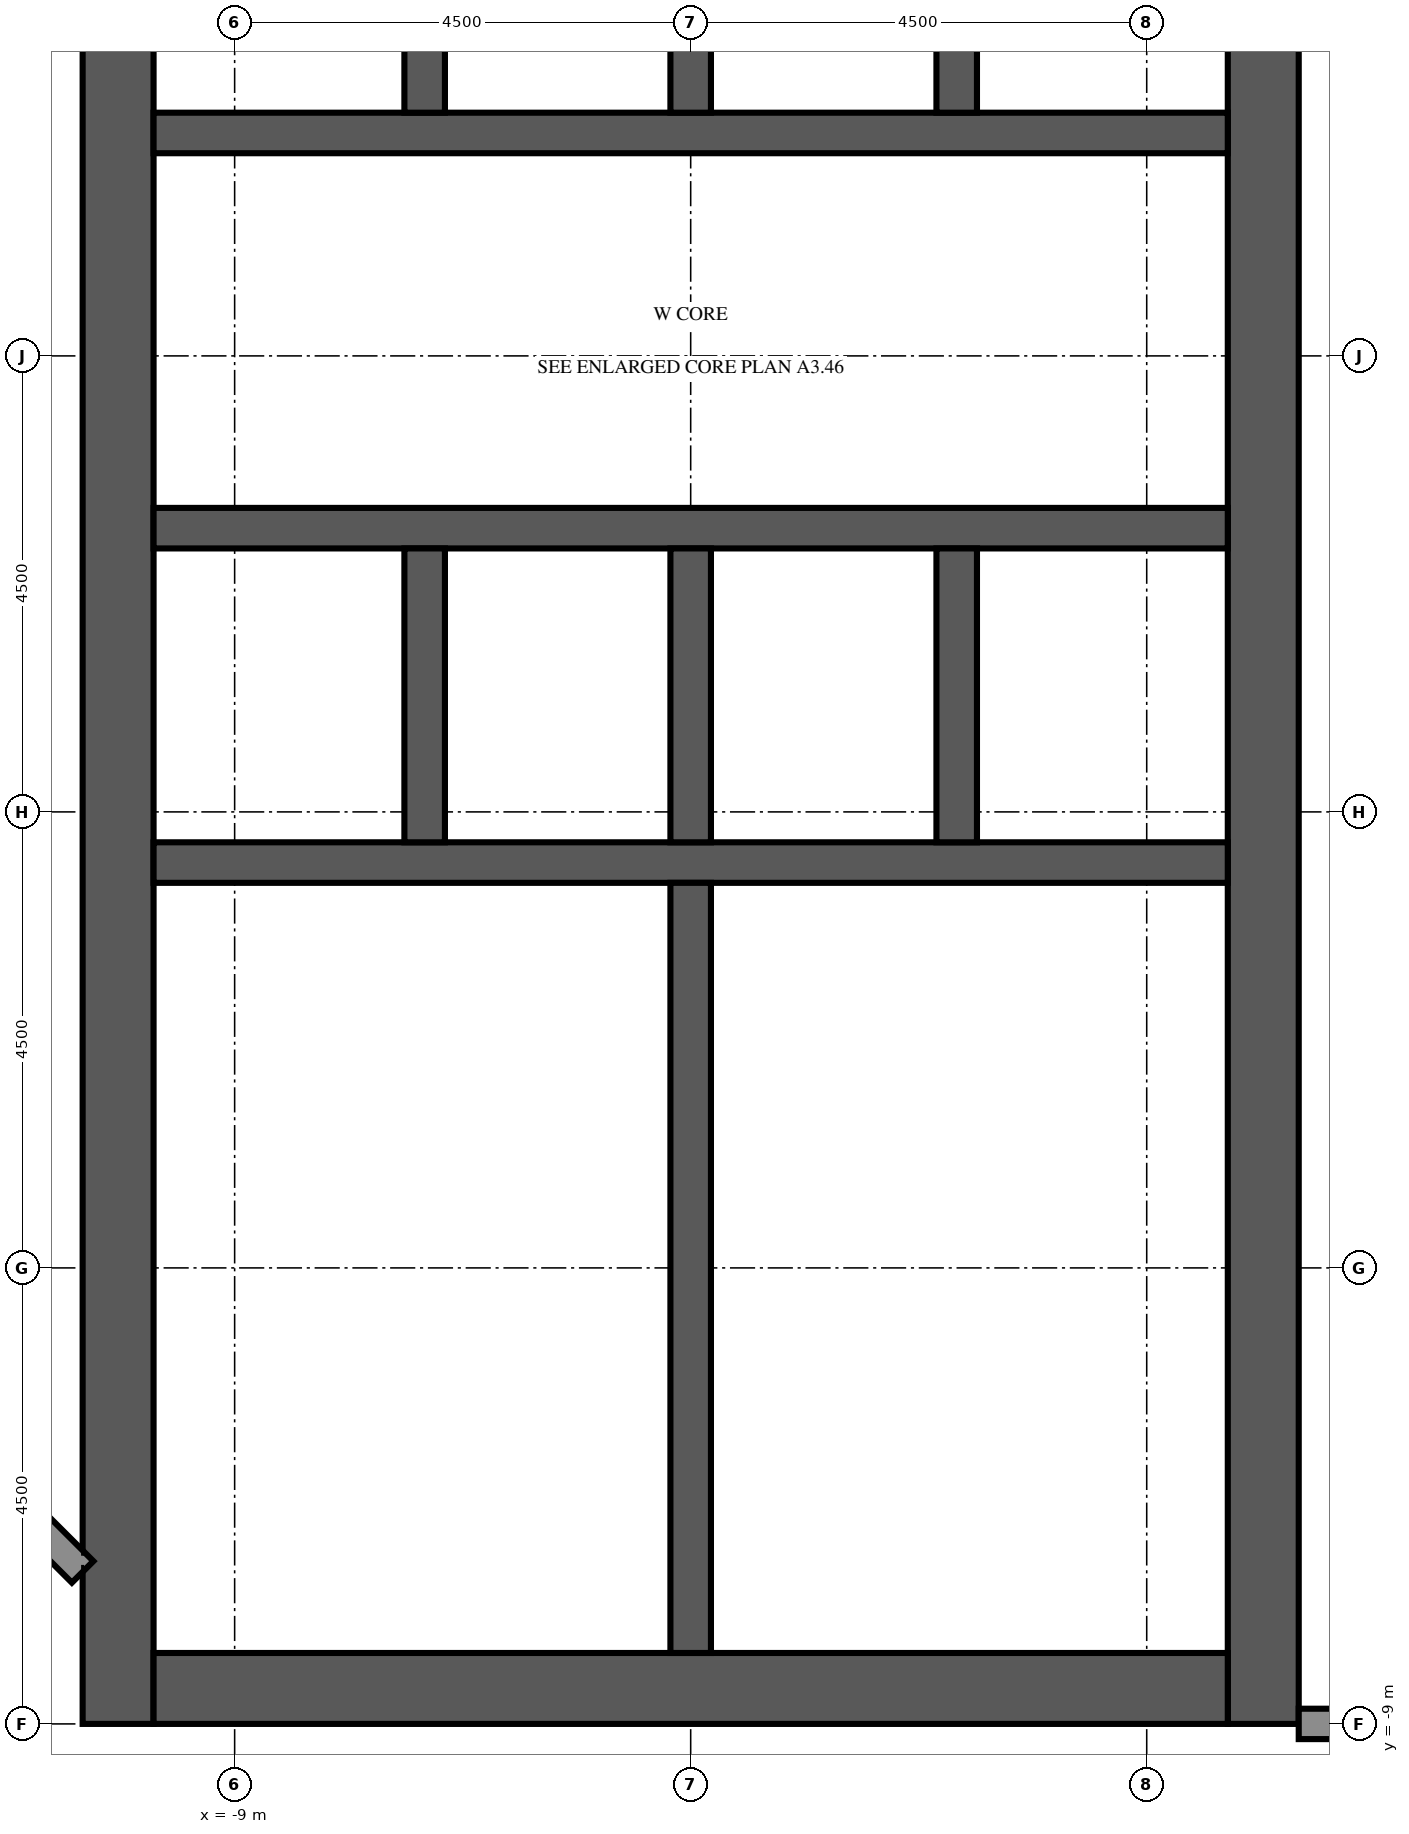
"""IFC4 building model, lengths in metres.
Left out: names, types, materials, properties, quantities, classifications, styles, units other than length and angle.
Written with IfcOpenShell. Run it as: python <this file> out.ifc"""

import sys

from ifc_helpers import new_model, si_unit, direction, frame, frame_2d, origin, place, context, subcontext, project, spatial, rectangle, extrude, element, fill, save


model = new_model("IFC4")
c1 = context("Model", 3, precision=1e-05, world=origin(), true_north=direction((0.0, 1.0)))
c2 = subcontext(c1, "Body", "Model", "MODEL_VIEW")
j1 = project(units=[si_unit("LENGTHUNIT", "METRE"), si_unit("PLANEANGLEUNIT", "RADIAN")], contexts=[c1])
p1 = place(None, origin())
s1 = spatial("IfcSite", under=j1, at=p1, CompositionType="ELEMENT")
p2 = place(p1, origin())
s2 = spatial("IfcBuilding", under=s1, at=p2, CompositionType="ELEMENT")
p3 = place(p2, frame((0.0, 0.0, 321.4)))
s3 = spatial("IfcBuildingStorey", under=s2, at=p3, CompositionType="ELEMENT", Elevation=321.4)
p4 = place(p3, frame((-10.15, -9.0, 0.0), z_axis=(0.0, 0.0, 1.0), x_axis=(0.0, 1.0, 0.0)))
e1 = element("IfcWall", 1, at=p4, inside=s3, PredefinedType="SHEAR", context=c2, shape_type="SweptSolid", body=[
    extrude(rectangle(XDim=27.5, YDim=0.7, at=frame_2d((13.75, 0.0))), origin(), (0.0, 0.0, 1.0), 4.8),
])
p5 = place(p4, frame((12.55, 0.0, 0.0)))
e2 = element("IfcOpeningElement", 2, at=p5, cuts=e1, PredefinedType="OPENING", context=c2, shape_type="SweptSolid", body=[
    extrude(rectangle(XDim=2.4, YDim=2.4, at=frame_2d((1.2, 1.2))), frame((0.0, 0.36, 0.0), z_axis=(0.0, -1.0, 0.0), x_axis=(1.0, 0.0, 0.0)), (0.0, 0.0, 1.0), 0.72),
])
p6 = place(p4, frame((6.825, 0.0, 0.0)))
e3 = element("IfcOpeningElement", 3, at=p6, cuts=e1, PredefinedType="OPENING", context=c2, shape_type="SweptSolid", body=[
    extrude(rectangle(XDim=1.2, YDim=2.1, at=frame_2d((0.6, 1.05))), frame((0.0, 0.36, 0.0), z_axis=(0.0, -1.0, 0.0), x_axis=(1.0, 0.0, 0.0)), (0.0, 0.0, 1.0), 0.72),
])
p7 = place(p4, frame((19.475, 0.0, 0.0)))
e4 = element("IfcOpeningElement", 4, at=p7, cuts=e1, PredefinedType="OPENING", context=c2, shape_type="SweptSolid", body=[
    extrude(rectangle(XDim=1.2, YDim=2.1, at=frame_2d((0.6, 1.05))), frame((0.0, 0.36, 0.0), z_axis=(0.0, -1.0, 0.0), x_axis=(1.0, 0.0, 0.0)), (0.0, 0.0, 1.0), 0.72),
])
p8 = place(p3, frame((1.15, -9.0, 0.0), z_axis=(0.0, 0.0, 1.0), x_axis=(0.0, 1.0, 0.0)))
e5 = element("IfcWall", 5, at=p8, inside=s3, PredefinedType="SHEAR", context=c2, shape_type="SweptSolid", body=[
    extrude(rectangle(XDim=27.5, YDim=0.7, at=frame_2d((13.75, 0.0))), origin(), (0.0, 0.0, 1.0), 4.8),
])
p9 = place(p8, frame((12.55, 0.0, 0.0)))
e6 = element("IfcOpeningElement", 6, at=p9, cuts=e5, PredefinedType="OPENING", context=c2, shape_type="SweptSolid", body=[
    extrude(rectangle(XDim=2.4, YDim=2.4, at=frame_2d((1.2, 1.2))), frame((0.0, 0.36, 0.0), z_axis=(0.0, -1.0, 0.0), x_axis=(1.0, 0.0, 0.0)), (0.0, 0.0, 1.0), 0.72),
])
p10 = place(p8, frame((5.42, 0.0, 0.0)))
e7 = element("IfcOpeningElement", 7, at=p10, cuts=e5, PredefinedType="OPENING", context=c2, shape_type="SweptSolid", body=[
    extrude(rectangle(XDim=1.2, YDim=2.1, at=frame_2d((0.6, 1.05))), frame((0.0, 0.36, 0.0), z_axis=(0.0, -1.0, 0.0), x_axis=(1.0, 0.0, 0.0)), (0.0, 0.0, 1.0), 0.72),
])
p11 = place(p8, frame((19.46, 0.0, 0.0)))
e8 = element("IfcOpeningElement", 8, at=p11, cuts=e5, PredefinedType="OPENING", context=c2, shape_type="SweptSolid", body=[
    extrude(rectangle(XDim=1.0, YDim=2.1, at=frame_2d((0.5, 1.05))), frame((0.0, 0.36, 0.0), z_axis=(0.0, -1.0, 0.0), x_axis=(1.0, 0.0, 0.0)), (0.0, 0.0, 1.0), 0.72),
])
p12 = place(p8, frame((21.17, 0.0, 0.0)))
e9 = element("IfcOpeningElement", 9, at=p12, cuts=e5, PredefinedType="OPENING", context=c2, shape_type="SweptSolid", body=[
    extrude(rectangle(XDim=1.0, YDim=2.1, at=frame_2d((0.5, 1.05))), frame((0.0, 0.36, 0.0), z_axis=(0.0, -1.0, 0.0), x_axis=(1.0, 0.0, 0.0)), (0.0, 0.0, 1.0), 0.72),
])
p13 = place(p8, frame((23.26, 0.0, 0.0)))
e10 = element("IfcOpeningElement", 10, at=p13, cuts=e5, PredefinedType="OPENING", context=c2, shape_type="SweptSolid", body=[
    extrude(rectangle(XDim=1.0, YDim=2.1, at=frame_2d((0.5, 1.05))), frame((0.0, 0.36, 0.0), z_axis=(0.0, -1.0, 0.0), x_axis=(1.0, 0.0, 0.0)), (0.0, 0.0, 1.0), 0.72),
])
p14 = place(p8, frame((25.35, 0.0, 0.0)))
e11 = element("IfcOpeningElement", 11, at=p14, cuts=e5, PredefinedType="OPENING", context=c2, shape_type="SweptSolid", body=[
    extrude(rectangle(XDim=1.0, YDim=2.1, at=frame_2d((0.5, 1.05))), frame((0.0, 0.36, 0.0), z_axis=(0.0, -1.0, 0.0), x_axis=(1.0, 0.0, 0.0)), (0.0, 0.0, 1.0), 0.72),
])
p15 = place(p3, frame((-9.8, -8.65, 0.0), z_axis=(0.0, 0.0, 1.0), x_axis=(1.0, 0.0, 0.0)))
e12 = element("IfcWall", 12, at=p15, inside=s3, PredefinedType="SHEAR", context=c2, shape_type="SweptSolid", body=[
    extrude(rectangle(XDim=10.6, YDim=0.7, at=frame_2d((5.3, 0.0))), origin(), (0.0, 0.0, 1.0), 4.8),
])
p16 = place(p3, frame((-9.8, -0.5, 0.0), z_axis=(0.0, 0.0, 1.0), x_axis=(1.0, 0.0, 0.0)))
e13 = element("IfcWall", 13, at=p16, inside=s3, PredefinedType="SHEAR", context=c2, shape_type="SweptSolid", body=[
    extrude(rectangle(XDim=10.6, YDim=0.4, at=frame_2d((5.3, 0.0))), origin(), (0.0, 0.0, 1.0), 4.8),
])
p17 = place(p3, frame((-9.8, 2.8, 0.0), z_axis=(0.0, 0.0, 1.0), x_axis=(1.0, 0.0, 0.0)))
e14 = element("IfcWall", 14, at=p17, inside=s3, PredefinedType="SHEAR", context=c2, shape_type="SweptSolid", body=[
    extrude(rectangle(XDim=10.6, YDim=0.4, at=frame_2d((5.3, 0.0))), origin(), (0.0, 0.0, 1.0), 4.8),
])
p18 = place(p17, frame((0.688, 0.0, 0.0)))
e15 = element("IfcOpeningElement", 15, at=p18, cuts=e14, PredefinedType="OPENING", context=c2, shape_type="SweptSolid", body=[
    extrude(rectangle(XDim=1.1, YDim=2.1, at=frame_2d((0.55, 1.05))), frame((0.0, 0.21, 0.0), z_axis=(0.0, -1.0, 0.0), x_axis=(1.0, 0.0, 0.0)), (0.0, 0.0, 1.0), 0.42),
])
p19 = place(p17, frame((3.438, 0.0, 0.0)))
e16 = element("IfcOpeningElement", 16, at=p19, cuts=e14, PredefinedType="OPENING", context=c2, shape_type="SweptSolid", body=[
    extrude(rectangle(XDim=1.1, YDim=2.1, at=frame_2d((0.55, 1.05))), frame((0.0, 0.21, 0.0), z_axis=(0.0, -1.0, 0.0), x_axis=(1.0, 0.0, 0.0)), (0.0, 0.0, 1.0), 0.42),
])
p20 = place(p17, frame((6.113, 0.0, 0.0)))
e17 = element("IfcOpeningElement", 17, at=p20, cuts=e14, PredefinedType="OPENING", context=c2, shape_type="SweptSolid", body=[
    extrude(rectangle(XDim=1.0, YDim=2.1, at=frame_2d((0.5, 1.05))), frame((0.0, 0.21, 0.0), z_axis=(0.0, -1.0, 0.0), x_axis=(1.0, 0.0, 0.0)), (0.0, 0.0, 1.0), 0.42),
])
p21 = place(p17, frame((8.863, 0.0, 0.0)))
e18 = element("IfcOpeningElement", 18, at=p21, cuts=e14, PredefinedType="OPENING", context=c2, shape_type="SweptSolid", body=[
    extrude(rectangle(XDim=1.0, YDim=2.1, at=frame_2d((0.5, 1.05))), frame((0.0, 0.21, 0.0), z_axis=(0.0, -1.0, 0.0), x_axis=(1.0, 0.0, 0.0)), (0.0, 0.0, 1.0), 0.42),
])
p22 = place(p3, frame((-9.8, 6.7, 0.0), z_axis=(0.0, 0.0, 1.0), x_axis=(1.0, 0.0, 0.0)))
e19 = element("IfcWall", 19, at=p22, inside=s3, PredefinedType="SHEAR", context=c2, shape_type="SweptSolid", body=[
    extrude(rectangle(XDim=10.6, YDim=0.4, at=frame_2d((5.3, 0.0))), origin(), (0.0, 0.0, 1.0), 4.8),
])
p23 = place(p22, frame((0.738, 0.0, 0.0)))
e20 = element("IfcOpeningElement", 20, at=p23, cuts=e19, PredefinedType="OPENING", context=c2, shape_type="SweptSolid", body=[
    extrude(rectangle(XDim=1.0, YDim=2.1, at=frame_2d((0.5, 1.05))), frame((0.0, 0.21, 0.0), z_axis=(0.0, -1.0, 0.0), x_axis=(1.0, 0.0, 0.0)), (0.0, 0.0, 1.0), 0.42),
])
p24 = place(p22, frame((3.488, 0.0, 0.0)))
e21 = element("IfcOpeningElement", 21, at=p24, cuts=e19, PredefinedType="OPENING", context=c2, shape_type="SweptSolid", body=[
    extrude(rectangle(XDim=1.0, YDim=2.1, at=frame_2d((0.5, 1.05))), frame((0.0, 0.21, 0.0), z_axis=(0.0, -1.0, 0.0), x_axis=(1.0, 0.0, 0.0)), (0.0, 0.0, 1.0), 0.42),
])
p25 = place(p22, frame((6.113, 0.0, 0.0)))
e22 = element("IfcOpeningElement", 22, at=p25, cuts=e19, PredefinedType="OPENING", context=c2, shape_type="SweptSolid", body=[
    extrude(rectangle(XDim=1.0, YDim=2.1, at=frame_2d((0.5, 1.05))), frame((0.0, 0.21, 0.0), z_axis=(0.0, -1.0, 0.0), x_axis=(1.0, 0.0, 0.0)), (0.0, 0.0, 1.0), 0.42),
])
p26 = place(p22, frame((8.863, 0.0, 0.0)))
e23 = element("IfcOpeningElement", 23, at=p26, cuts=e19, PredefinedType="OPENING", context=c2, shape_type="SweptSolid", body=[
    extrude(rectangle(XDim=1.0, YDim=2.1, at=frame_2d((0.5, 1.05))), frame((0.0, 0.21, 0.0), z_axis=(0.0, -1.0, 0.0), x_axis=(1.0, 0.0, 0.0)), (0.0, 0.0, 1.0), 0.42),
])
for number, where, z_axis, x_axis in (
    (24, (-7.125, -0.3, 0.0), (0.0, 0.0, 1.0), (0.0, 1.0, 0.0)),
    (25, (-7.125, 6.9, 0.0), (0.0, 0.0, 1.0), (0.0, 1.0, 0.0)),
    (26, (-4.5, -0.3, 0.0), (0.0, 0.0, 1.0), (0.0, 1.0, 0.0)),
    (27, (-4.5, 6.9, 0.0), (0.0, 0.0, 1.0), (0.0, 1.0, 0.0)),
    (28, (-1.875, -0.3, 0.0), (0.0, 0.0, 1.0), (0.0, 1.0, 0.0)),
    (29, (-1.875, 6.9, 0.0), (0.0, 0.0, 1.0), (0.0, 1.0, 0.0)),
):
    element("IfcWall", number, at=place(p3, frame(where, z_axis=z_axis, x_axis=x_axis)), inside=s3, PredefinedType="SHEAR", context=c2, shape_type="SweptSolid", body=[
        extrude(rectangle(XDim=2.9, YDim=0.4, at=frame_2d((1.45, 0.0))), origin(), (0.0, 0.0, 1.0), 4.8),
    ])
p27 = place(p3, frame((-4.5, -8.3, 0.0), z_axis=(0.0, 0.0, 1.0), x_axis=(0.0, 1.0, 0.0)))
e30 = element("IfcWall", 30, at=p27, inside=s3, PredefinedType="SHEAR", context=c2, shape_type="SweptSolid", body=[
    extrude(rectangle(XDim=7.6, YDim=0.4, at=frame_2d((3.8, 0.0))), origin(), (0.0, 0.0, 1.0), 4.8),
])
p28 = place(p3, frame((1.5, -9.0, 0.0), z_axis=(0.0, 0.0, 1.0), x_axis=(1.0, 0.0, 0.0)))
e31 = element("IfcWall", 31, at=p28, inside=s3, PredefinedType="SOLIDWALL", context=c2, shape_type="SweptSolid", body=[
    extrude(rectangle(XDim=2.65, YDim=0.3, at=frame_2d((1.325, 0.0))), origin(), (0.0, 0.0, 1.0), 0.85),
])
p29 = place(p3, frame((-13.15, -4.85, 0.0), z_axis=(0.0, 0.0, 1.0), x_axis=(0.707106781187, -0.707106781187, 0.0)))
e32 = element("IfcWall", 32, at=p29, inside=s3, PredefinedType="SOLIDWALL", context=c2, shape_type="SweptSolid", body=[
    extrude(rectangle(XDim=3.748, YDim=0.3, at=frame_2d((1.874, 0.0))), origin(), (0.0, 0.0, 1.0), 3.5),
])
p30 = place(p3, frame((-0.7, -5.26, 0.0), z_axis=(0.0, 0.0, 1.0), x_axis=(1.0, 0.0, 0.0)))
e33 = element("IfcWall", 33, at=p30, inside=s3, PredefinedType="PARTITIONING", context=c2, shape_type="SweptSolid", body=[
    extrude(rectangle(XDim=1.5, YDim=0.1, at=frame_2d((0.75, 0.0))), origin(), (0.0, 0.0, 1.0), 4.2),
])
p31 = place(p30, frame((0.25, 0.0, 0.0)))
e34 = element("IfcOpeningElement", 34, at=p31, cuts=e33, PredefinedType="OPENING", context=c2, shape_type="SweptSolid", body=[
    extrude(rectangle(XDim=1.0, YDim=2.1, at=frame_2d((0.5, 1.05))), frame((0.0, 0.06, 0.0), z_axis=(0.0, -1.0, 0.0), x_axis=(1.0, 0.0, 0.0)), (0.0, 0.0, 1.0), 0.12),
])
p32 = place(p3, frame((-0.7, -5.26, 0.0), z_axis=(0.0, 0.0, 1.0), x_axis=(0.0, 1.0, 0.0)))
e35 = element("IfcWall", 35, at=p32, inside=s3, PredefinedType="PARTITIONING", context=c2, shape_type="SweptSolid", body=[
    extrude(rectangle(XDim=2.28, YDim=0.1, at=frame_2d((1.14, 0.0))), origin(), (0.0, 0.0, 1.0), 4.2),
])
p33 = place(p32, frame((0.64, 0.0, 0.0)))
e36 = element("IfcOpeningElement", 36, at=p33, cuts=e35, PredefinedType="OPENING", context=c2, shape_type="SweptSolid", body=[
    extrude(rectangle(XDim=1.0, YDim=2.1, at=frame_2d((0.5, 1.05))), frame((0.0, 0.06, 0.0), z_axis=(0.0, -1.0, 0.0), x_axis=(1.0, 0.0, 0.0)), (0.0, 0.0, 1.0), 0.12),
])
p34 = place(p3, frame((-0.7, -2.98, 0.0), z_axis=(0.0, 0.0, 1.0), x_axis=(0.0, 1.0, 0.0)))
e37 = element("IfcWall", 37, at=p34, inside=s3, PredefinedType="PARTITIONING", context=c2, shape_type="SweptSolid", body=[
    extrude(rectangle(XDim=2.28, YDim=0.1, at=frame_2d((1.14, 0.0))), origin(), (0.0, 0.0, 1.0), 4.2),
])
p35 = place(p34, frame((0.64, 0.0, 0.0)))
e38 = element("IfcOpeningElement", 38, at=p35, cuts=e37, PredefinedType="OPENING", context=c2, shape_type="SweptSolid", body=[
    extrude(rectangle(XDim=1.0, YDim=2.1, at=frame_2d((0.5, 1.05))), frame((0.0, 0.06, 0.0), z_axis=(0.0, -1.0, 0.0), x_axis=(1.0, 0.0, 0.0)), (0.0, 0.0, 1.0), 0.12),
])
for number, where, z_axis, x_axis in (
    (39, (-4.3, -5.26, 0.0), (0.0, 0.0, 1.0), (1.0, 0.0, 0.0)),
    (40, (-4.3, -2.98, 0.0), (0.0, 0.0, 1.0), (1.0, 0.0, 0.0)),
):
    element("IfcWall", number, at=place(p3, frame(where, z_axis=z_axis, x_axis=x_axis)), inside=s3, PredefinedType="PARTITIONING", context=c2, shape_type="SweptSolid", body=[
        extrude(rectangle(XDim=3.6, YDim=0.1, at=frame_2d((1.8, 0.0))), origin(), (0.0, 0.0, 1.0), 4.2),
    ])
p36 = place(p18, origin())
e41 = element("IfcDoor", 41, at=p36, inside=s3, OperationType="DOUBLE_DOOR_SLIDING", PredefinedType="DOOR", context=c2, shape_type="SweptSolid", body=[
    extrude(rectangle(XDim=1.1, YDim=2.1, at=frame_2d((0.55, 1.05))), frame((0.0, 0.025, 0.0), z_axis=(0.0, -1.0, 0.0), x_axis=(1.0, 0.0, 0.0)), (0.0, 0.0, 1.0), 0.05),
])
fill(e15, e41)
p37 = place(p19, origin())
e42 = element("IfcDoor", 42, at=p37, inside=s3, OperationType="DOUBLE_DOOR_SLIDING", PredefinedType="DOOR", context=c2, shape_type="SweptSolid", body=[
    extrude(rectangle(XDim=1.1, YDim=2.1, at=frame_2d((0.55, 1.05))), frame((0.0, 0.025, 0.0), z_axis=(0.0, -1.0, 0.0), x_axis=(1.0, 0.0, 0.0)), (0.0, 0.0, 1.0), 0.05),
])
fill(e16, e42)
p38 = place(p5, origin())
e43 = element("IfcDoor", 43, at=p38, inside=s3, OperationType="DOUBLE_DOOR_DOUBLE_SWING", PredefinedType="DOOR", context=c2, shape_type="SweptSolid", body=[
    extrude(rectangle(XDim=2.4, YDim=2.4, at=frame_2d((1.2, 1.2))), frame((0.0, 0.025, 0.0), z_axis=(0.0, -1.0, 0.0), x_axis=(1.0, 0.0, 0.0)), (0.0, 0.0, 1.0), 0.05),
])
fill(e2, e43)
p39 = place(p9, origin())
e44 = element("IfcDoor", 44, at=p39, inside=s3, OperationType="DOUBLE_DOOR_DOUBLE_SWING", PredefinedType="DOOR", context=c2, shape_type="SweptSolid", body=[
    extrude(rectangle(XDim=2.4, YDim=2.4, at=frame_2d((1.2, 1.2))), frame((0.0, 0.025, 0.0), z_axis=(0.0, -1.0, 0.0), x_axis=(1.0, 0.0, 0.0)), (0.0, 0.0, 1.0), 0.05),
])
fill(e6, e44)
p40 = place(p6, origin())
e45 = element("IfcDoor", 45, at=p40, inside=s3, OperationType="SINGLE_SWING_LEFT", PredefinedType="DOOR", context=c2, shape_type="SweptSolid", body=[
    extrude(rectangle(XDim=1.2, YDim=2.1, at=frame_2d((0.6, 1.05))), frame((0.0, 0.025, 0.0), z_axis=(0.0, -1.0, 0.0), x_axis=(1.0, 0.0, 0.0)), (0.0, 0.0, 1.0), 0.05),
])
fill(e3, e45)
p41 = place(p20, origin())
e46 = element("IfcDoor", 46, at=p41, inside=s3, OperationType="SINGLE_SWING_LEFT", PredefinedType="DOOR", context=c2, shape_type="SweptSolid", body=[
    extrude(rectangle(XDim=1.0, YDim=2.1, at=frame_2d((0.5, 1.05))), frame((0.0, 0.025, 0.0), z_axis=(0.0, -1.0, 0.0), x_axis=(1.0, 0.0, 0.0)), (0.0, 0.0, 1.0), 0.05),
])
fill(e17, e46)
p42 = place(p21, origin())
e47 = element("IfcDoor", 47, at=p42, inside=s3, OperationType="SINGLE_SWING_RIGHT", PredefinedType="DOOR", context=c2, shape_type="SweptSolid", body=[
    extrude(rectangle(XDim=1.0, YDim=2.1, at=frame_2d((0.5, 1.05))), frame((0.0, 0.025, 0.0), z_axis=(0.0, -1.0, 0.0), x_axis=(1.0, 0.0, 0.0)), (0.0, 0.0, 1.0), 0.05),
])
fill(e18, e47)
p43 = place(p23, origin())
e48 = element("IfcDoor", 48, at=p43, inside=s3, OperationType="SINGLE_SWING_LEFT", PredefinedType="DOOR", context=c2, shape_type="SweptSolid", body=[
    extrude(rectangle(XDim=1.0, YDim=2.1, at=frame_2d((0.5, 1.05))), frame((0.0, 0.025, 0.0), z_axis=(0.0, -1.0, 0.0), x_axis=(1.0, 0.0, 0.0)), (0.0, 0.0, 1.0), 0.05),
])
fill(e20, e48)
p44 = place(p24, origin())
e49 = element("IfcDoor", 49, at=p44, inside=s3, OperationType="SINGLE_SWING_RIGHT", PredefinedType="DOOR", context=c2, shape_type="SweptSolid", body=[
    extrude(rectangle(XDim=1.0, YDim=2.1, at=frame_2d((0.5, 1.05))), frame((0.0, 0.025, 0.0), z_axis=(0.0, -1.0, 0.0), x_axis=(1.0, 0.0, 0.0)), (0.0, 0.0, 1.0), 0.05),
])
fill(e21, e49)
p45 = place(p25, origin())
e50 = element("IfcDoor", 50, at=p45, inside=s3, OperationType="SINGLE_SWING_LEFT", PredefinedType="DOOR", context=c2, shape_type="SweptSolid", body=[
    extrude(rectangle(XDim=1.0, YDim=2.1, at=frame_2d((0.5, 1.05))), frame((0.0, 0.025, 0.0), z_axis=(0.0, -1.0, 0.0), x_axis=(1.0, 0.0, 0.0)), (0.0, 0.0, 1.0), 0.05),
])
fill(e22, e50)
p46 = place(p26, origin())
e51 = element("IfcDoor", 51, at=p46, inside=s3, OperationType="SINGLE_SWING_RIGHT", PredefinedType="DOOR", context=c2, shape_type="SweptSolid", body=[
    extrude(rectangle(XDim=1.0, YDim=2.1, at=frame_2d((0.5, 1.05))), frame((0.0, 0.025, 0.0), z_axis=(0.0, -1.0, 0.0), x_axis=(1.0, 0.0, 0.0)), (0.0, 0.0, 1.0), 0.05),
])
fill(e23, e51)
p47 = place(p10, origin())
e52 = element("IfcDoor", 52, at=p47, inside=s3, OperationType="SINGLE_SWING_LEFT", PredefinedType="DOOR", context=c2, shape_type="SweptSolid", body=[
    extrude(rectangle(XDim=1.2, YDim=2.1, at=frame_2d((0.6, 1.05))), frame((0.0, 0.325, 0.0), z_axis=(0.0, -1.0, 0.0), x_axis=(1.0, 0.0, 0.0)), (0.0, 0.0, 1.0), 0.05),
])
fill(e7, e52)
p48 = place(p31, origin())
e53 = element("IfcDoor", 53, at=p48, inside=s3, OperationType="SINGLE_SWING_RIGHT", PredefinedType="DOOR", context=c2, shape_type="SweptSolid", body=[
    extrude(rectangle(XDim=1.0, YDim=2.1, at=frame_2d((0.5, 1.05))), frame((0.0, 0.025, 0.0), z_axis=(0.0, -1.0, 0.0), x_axis=(1.0, 0.0, 0.0)), (0.0, 0.0, 1.0), 0.05),
])
fill(e34, e53)
p49 = place(p33, origin())
e54 = element("IfcDoor", 54, at=p49, inside=s3, OperationType="SINGLE_SWING_LEFT", PredefinedType="DOOR", context=c2, shape_type="SweptSolid", body=[
    extrude(rectangle(XDim=1.0, YDim=2.1, at=frame_2d((0.5, 1.05))), frame((0.0, 0.025, 0.0), z_axis=(0.0, -1.0, 0.0), x_axis=(1.0, 0.0, 0.0)), (0.0, 0.0, 1.0), 0.05),
])
fill(e36, e54)
p50 = place(p35, origin())
e55 = element("IfcDoor", 55, at=p50, inside=s3, OperationType="SINGLE_SWING_RIGHT", PredefinedType="DOOR", context=c2, shape_type="SweptSolid", body=[
    extrude(rectangle(XDim=1.0, YDim=2.1, at=frame_2d((0.5, 1.05))), frame((0.0, 0.025, 0.0), z_axis=(0.0, -1.0, 0.0), x_axis=(1.0, 0.0, 0.0)), (0.0, 0.0, 1.0), 0.05),
])
fill(e38, e55)
save(model, sys.argv[1])
